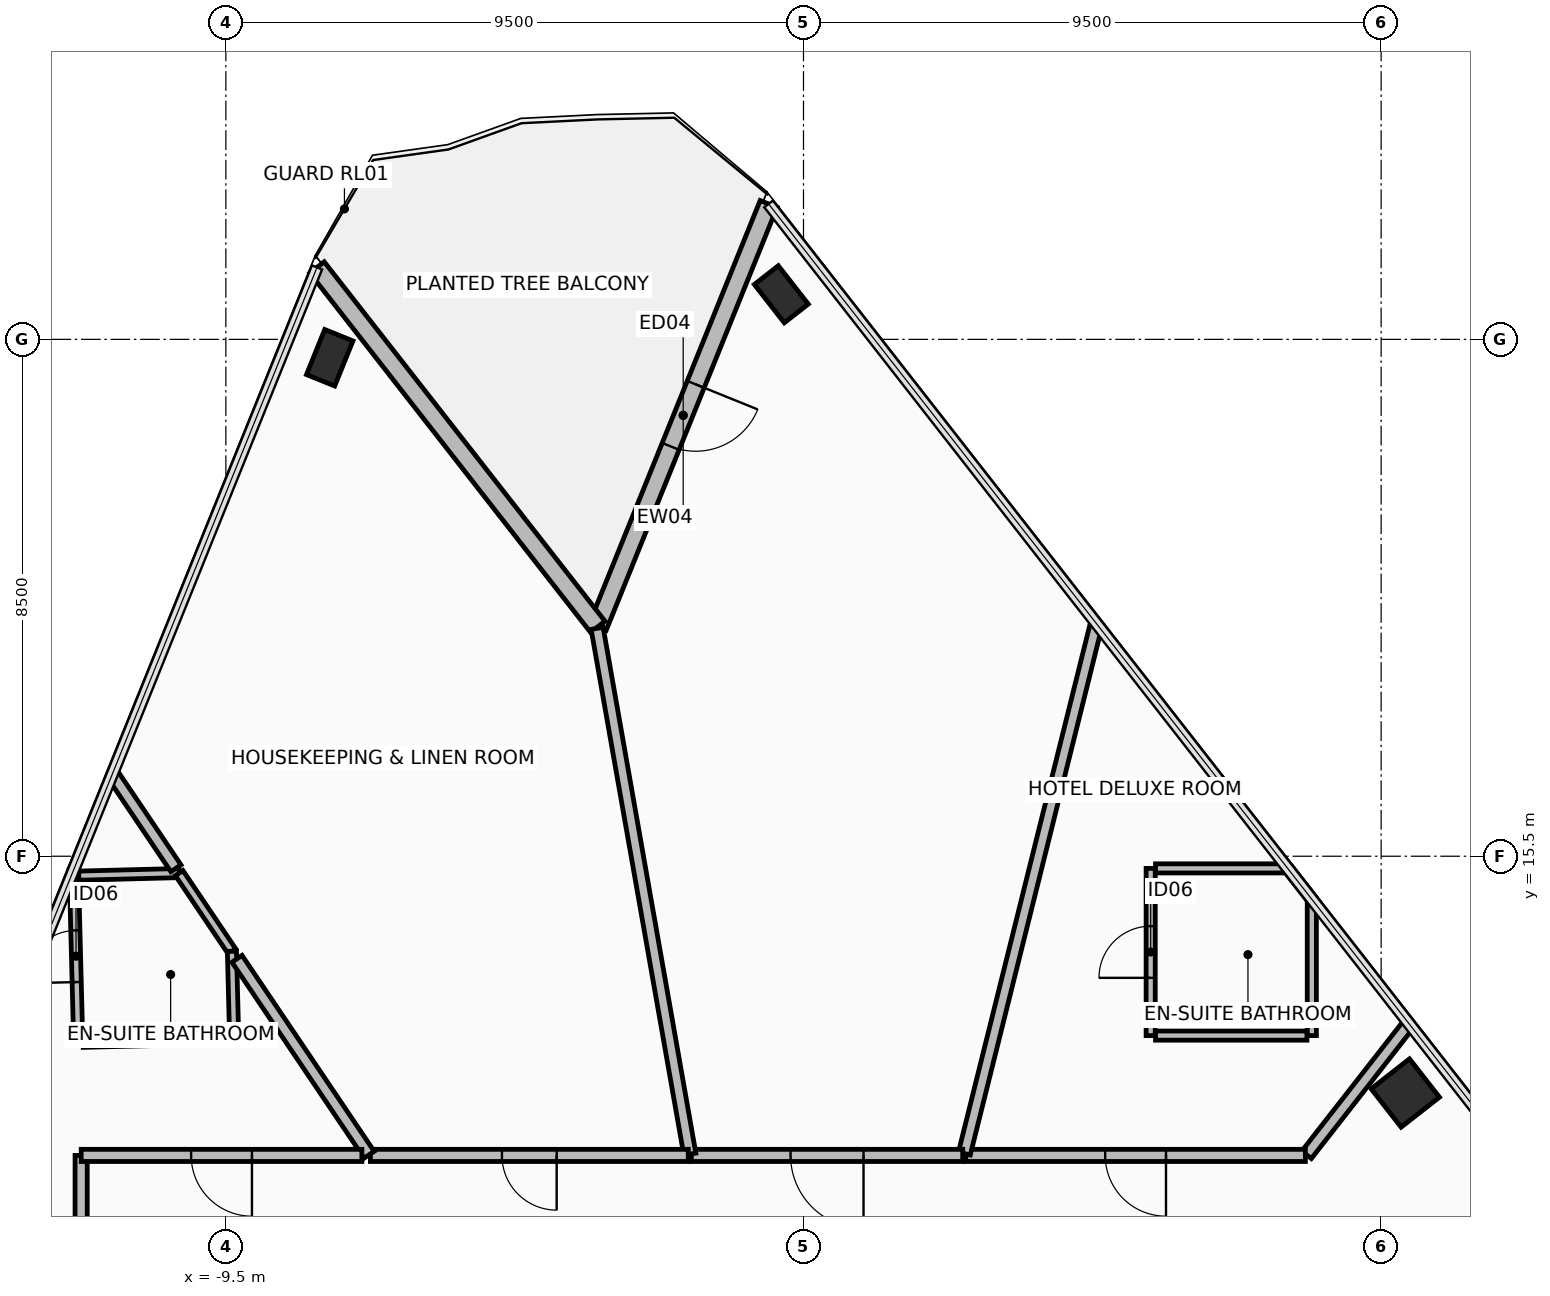
"""IFC4 building model, lengths in metres.
Left out: names, types, materials, properties, quantities, classifications, styles, units other than length and angle.
Written with IfcOpenShell. Run it as: python <this file> out.ifc"""

import sys

from ifc_helpers import new_model, si_unit, direction, frame, frame_2d, origin, origin_2d, place, context, subcontext, project, spatial, rectangle, hollow_rectangle, extrude, element, fill, save


model = new_model("IFC4")
c1 = context("Model", 3, precision=1e-05, world=origin(), true_north=direction((0.0, 1.0)))
c2 = subcontext(c1, "Body", "Model", "MODEL_VIEW")
j1 = project(units=[si_unit("LENGTHUNIT", "METRE"), si_unit("PLANEANGLEUNIT", "RADIAN")], contexts=[c1])
p1 = place(None, origin())
s1 = spatial("IfcSite", under=j1, at=p1, CompositionType="ELEMENT")
p2 = place(p1, origin())
s2 = spatial("IfcBuilding", under=s1, at=p2, CompositionType="ELEMENT")
p3 = place(p2, frame((0.0, 0.0, 60.45)))
s3 = spatial("IfcBuildingStorey", under=s2, at=p3, CompositionType="ELEMENT", Elevation=60.45)
p4 = place(p3, frame((-7.792, 23.698, 0.0), z_axis=(0.0, 0.0, 1.0), x_axis=(0.374608211656, 0.927183200754, 0.0)))
e1 = element("IfcColumn", 1, at=p4, inside=s3, PredefinedType="COLUMN", context=c2, shape_type="SweptSolid", body=[
    extrude(hollow_rectangle(XDim=0.5, YDim=0.8, WallThickness=0.04, at=origin_2d()), origin(), (0.0, 0.0, 1.0), 3.4),
])
p5 = place(p3, frame((9.898, 11.606, 0.0), z_axis=(0.0, 0.0, 1.0), x_axis=(-0.615661475326, 0.788010753607, 0.0)))
e2 = element("IfcColumn", 2, at=p5, inside=s3, PredefinedType="COLUMN", context=c2, shape_type="SweptSolid", body=[
    extrude(hollow_rectangle(XDim=0.8, YDim=0.8, WallThickness=0.045, at=origin_2d()), origin(), (0.0, 0.0, 1.0), 3.4),
])
p6 = place(p3, frame((-0.365, 24.741, 0.0), z_axis=(0.0, 0.0, 1.0), x_axis=(-0.615661475326, 0.788010753607, 0.0)))
e3 = element("IfcColumn", 3, at=p6, inside=s3, PredefinedType="COLUMN", context=c2, shape_type="SweptSolid", body=[
    extrude(hollow_rectangle(XDim=0.5, YDim=0.8, WallThickness=0.04, at=origin_2d()), origin(), (0.0, 0.0, 1.0), 3.4),
])
p7 = place(p3, frame((-0.574, 26.227, 0.0), z_axis=(0.0, 0.0, 1.0), x_axis=(-0.374609979755, -0.92718248639, 0.0)))
e4 = element("IfcWall", 4, at=p7, inside=s3, PredefinedType="STANDARD", context=c2, shape_type="SweptSolid", body=[
    extrude(rectangle(XDim=7.5, YDim=0.3, at=frame_2d((3.75, 0.0))), origin(), (0.0, 0.0, 1.0), 2.42),
])
p8 = place(p7, frame((3.2, 0.0, 0.0)))
e5 = element("IfcOpeningElement", 5, at=p8, cuts=e4, PredefinedType="OPENING", context=c2, shape_type="SweptSolid", body=[
    extrude(rectangle(XDim=1.1, YDim=2.2, at=frame_2d((0.55, 1.1))), frame((0.0, 0.16, 0.0), z_axis=(0.0, -1.0, 0.0), x_axis=(1.0, 0.0, 0.0)), (0.0, 0.0, 1.0), 0.32),
])
p9 = place(p3, frame((-3.383, 19.273, 0.0), z_axis=(0.0, 0.0, 1.0), x_axis=(-0.615654149001, 0.788016477504, 0.0)))
e6 = element("IfcWall", 6, at=p9, inside=s3, PredefinedType="STANDARD", context=c2, shape_type="SweptSolid", body=[
    extrude(rectangle(XDim=7.5, YDim=0.3, at=frame_2d((3.75, 0.0))), origin(), (0.0, 0.0, 1.0), 2.42),
])
p10 = place(p3, frame((5.71, 12.55, 0.0), z_axis=(0.0, 0.0, 1.0), x_axis=(0.0, 1.0, 0.0)))
e7 = element("IfcWall", 7, at=p10, inside=s3, PredefinedType="PARTITIONING", context=c2, shape_type="SweptSolid", body=[
    extrude(rectangle(XDim=2.75, YDim=0.15, at=frame_2d((1.375, 0.0))), origin(), (0.0, 0.0, 1.0), 2.82),
])
p11 = place(p10, frame((0.95, 0.0, 0.0)))
e8 = element("IfcOpeningElement", 8, at=p11, cuts=e7, PredefinedType="OPENING", context=c2, shape_type="SweptSolid", body=[
    extrude(rectangle(XDim=0.85, YDim=2.1, at=frame_2d((0.425, 1.05))), frame((0.0, 0.085, 0.0), z_axis=(0.0, -1.0, 0.0), x_axis=(1.0, 0.0, 0.0)), (0.0, 0.0, 1.0), 0.17),
])
p12 = place(p3, frame((5.79, 15.3, 0.0), z_axis=(0.0, 0.0, 1.0), x_axis=(1.0, 0.0, 0.0)))
e9 = element("IfcWall", 9, at=p12, inside=s3, PredefinedType="PARTITIONING", context=c2, shape_type="SweptSolid", body=[
    extrude(rectangle(XDim=2.174, YDim=0.15, at=frame_2d((1.087, 0.0))), origin(), (0.0, 0.0, 1.0), 2.42),
])
p13 = place(p3, frame((7.963, 15.3, 0.0), z_axis=(0.0, 0.0, 1.0), x_axis=(0.615592549259, -0.788064599698, 0.0)))
e10 = element("IfcWall", 10, at=p13, inside=s3, PredefinedType="PARTITIONING", context=c2, shape_type="SweptSolid", body=[
    extrude(rectangle(XDim=0.644, YDim=0.15, at=frame_2d((0.322, 0.0))), origin(), (0.0, 0.0, 1.0), 3.225),
])
p14 = place(p3, frame((8.36, 14.792, 0.0), z_axis=(0.0, 0.0, 1.0), x_axis=(0.0, -1.0, 0.0)))
e11 = element("IfcWall", 11, at=p14, inside=s3, PredefinedType="PARTITIONING", context=c2, shape_type="SweptSolid", body=[
    extrude(rectangle(XDim=2.242, YDim=0.15, at=frame_2d((1.121, 0.0))), origin(), (0.0, 0.0, 1.0), 2.42),
])
p15 = place(p3, frame((8.28, 12.55, 0.0), z_axis=(0.0, 0.0, 1.0), x_axis=(-1.0, 0.0, 0.0)))
e12 = element("IfcWall", 12, at=p15, inside=s3, PredefinedType="PARTITIONING", context=c2, shape_type="SweptSolid", body=[
    extrude(rectangle(XDim=2.49, YDim=0.15, at=frame_2d((1.245, 0.0))), origin(), (0.0, 0.0, 1.0), 2.82),
])
p16 = place(p3, frame((-11.927, 12.429, 0.0), z_axis=(0.0, 0.0, 1.0), x_axis=(-0.025753181092, 0.99966833183, 0.0)))
e13 = element("IfcWall", 13, at=p16, inside=s3, PredefinedType="PARTITIONING", context=c2, shape_type="SweptSolid", body=[
    extrude(rectangle(XDim=2.854, YDim=0.15, at=frame_2d((1.427, 0.0))), origin(), (0.0, 0.0, 1.0), 2.42),
])
p17 = place(p16, frame((1.002, 0.0, 0.0)))
e14 = element("IfcOpeningElement", 14, at=p17, cuts=e13, PredefinedType="OPENING", context=c2, shape_type="SweptSolid", body=[
    extrude(rectangle(XDim=0.85, YDim=2.1, at=frame_2d((0.425, 1.05))), frame((0.0, 0.085, 0.0), z_axis=(0.0, -1.0, 0.0), x_axis=(1.0, 0.0, 0.0)), (0.0, 0.0, 1.0), 0.17),
])
p18 = place(p3, frame((-11.918, 15.18, 0.0), z_axis=(0.0, 0.0, 1.0), x_axis=(0.999668899852, 0.02573112257, 0.0)))
e15 = element("IfcWall", 15, at=p18, inside=s3, PredefinedType="PARTITIONING", context=c2, shape_type="SweptSolid", body=[
    extrude(rectangle(XDim=1.651, YDim=0.15, at=frame_2d((0.825, 0.0))), origin(), (0.0, 0.0, 1.0), 2.42),
])
p19 = place(p3, frame((-10.268, 15.223, 0.0), z_axis=(0.0, 0.0, 1.0), x_axis=(0.559229675695, -0.82901276819, 0.0)))
e16 = element("IfcWall", 16, at=p19, inside=s3, PredefinedType="PARTITIONING", context=c2, shape_type="SweptSolid", body=[
    extrude(rectangle(XDim=1.552, YDim=0.15, at=frame_2d((0.776, 0.0))), origin(), (0.0, 0.0, 1.0), 3.225),
])
p20 = place(p3, frame((-9.4, 13.936, 0.0), z_axis=(0.0, 0.0, 1.0), x_axis=(0.025745445057, -0.999668531094, 0.0)))
e17 = element("IfcWall", 17, at=p20, inside=s3, PredefinedType="PARTITIONING", context=c2, shape_type="SweptSolid", body=[
    extrude(rectangle(XDim=1.441, YDim=0.15, at=frame_2d((0.721, 0.0))), origin(), (0.0, 0.0, 1.0), 3.225),
])
p21 = place(p3, frame((-9.443, 12.493, 0.0), z_axis=(0.0, 0.0, 1.0), x_axis=(-0.999667618691, -0.025780848324, 0.0)))
e18 = element("IfcWall", 18, at=p21, inside=s3, PredefinedType="PARTITIONING", context=c2, shape_type="SweptSolid", body=[
    extrude(rectangle(XDim=2.405, YDim=0.15, at=frame_2d((1.203, 0.0))), origin(), (0.0, 0.0, 1.0), 3.225),
])
p22 = place(p3, frame((9.947, 12.731, 0.0), z_axis=(0.0, 0.0, 1.0), x_axis=(-0.615680653303, -0.787995769753, 0.0)))
e19 = element("IfcWall", 19, at=p22, inside=s3, PredefinedType="PARTITIONING", context=c2, shape_type="SweptSolid", body=[
    extrude(rectangle(XDim=2.718, YDim=0.2, at=frame_2d((1.359, 0.0))), origin(), (0.0, 0.0, 1.0), 2.42),
])
p23 = place(p3, frame((8.254, 10.58, 0.0), z_axis=(0.0, 0.0, 1.0), x_axis=(-1.0, 0.0, 0.0)))
e20 = element("IfcWall", 20, at=p23, inside=s3, PredefinedType="PARTITIONING", context=c2, shape_type="SweptSolid", body=[
    extrude(rectangle(XDim=5.584, YDim=0.2, at=frame_2d((2.792, 0.0))), origin(), (0.0, 0.0, 1.0), 2.62),
])
p24 = place(p23, frame((2.292, 0.0, 0.0)))
e21 = element("IfcOpeningElement", 21, at=p24, cuts=e20, PredefinedType="OPENING", context=c2, shape_type="SweptSolid", body=[
    extrude(rectangle(XDim=1.0, YDim=2.15, at=frame_2d((0.5, 1.075))), frame((0.0, 0.11, 0.0), z_axis=(0.0, -1.0, 0.0), x_axis=(1.0, 0.0, 0.0)), (0.0, 0.0, 1.0), 0.22),
])
p25 = place(p3, frame((2.646, 10.611, 0.0), z_axis=(0.0, 0.0, 1.0), x_axis=(0.241940721885, 0.970291032162, 0.0)))
e22 = element("IfcWall", 22, at=p25, inside=s3, PredefinedType="PARTITIONING", context=c2, shape_type="SweptSolid", body=[
    extrude(rectangle(XDim=8.981, YDim=0.2, at=frame_2d((4.49, 0.0))), origin(), (0.0, 0.0, 1.0), 2.42),
])
p26 = place(p3, frame((2.618, 10.58, 0.0), z_axis=(0.0, 0.0, 1.0), x_axis=(-1.0, 0.0, 0.0)))
e23 = element("IfcWall", 23, at=p26, inside=s3, PredefinedType="PARTITIONING", context=c2, shape_type="SweptSolid", body=[
    extrude(rectangle(XDim=4.463, YDim=0.2, at=frame_2d((2.231, 0.0))), origin(), (0.0, 0.0, 1.0), 2.62),
])
p27 = place(p26, frame((1.631, 0.0, 0.0)))
e24 = element("IfcOpeningElement", 24, at=p27, cuts=e23, PredefinedType="OPENING", context=c2, shape_type="SweptSolid", body=[
    extrude(rectangle(XDim=1.2, YDim=2.15, at=frame_2d((0.6, 1.075))), frame((0.0, 0.11, 0.0), z_axis=(0.0, -1.0, 0.0), x_axis=(1.0, 0.0, 0.0)), (0.0, 0.0, 1.0), 0.22),
])
p28 = place(p3, frame((-1.869, 10.601, 0.0), z_axis=(0.0, 0.0, 1.0), x_axis=(-0.173639404774, 0.98480929987, 0.0)))
e25 = element("IfcWall", 25, at=p28, inside=s3, PredefinedType="PARTITIONING", context=c2, shape_type="SweptSolid", body=[
    extrude(rectangle(XDim=8.781, YDim=0.2, at=frame_2d((4.39, 0.0))), origin(), (0.0, 0.0, 1.0), 3.225),
])
p29 = place(p3, frame((-1.895, 10.58, 0.0), z_axis=(0.0, 0.0, 1.0), x_axis=(-1.0, 0.0, 0.0)))
e26 = element("IfcWall", 26, at=p29, inside=s3, PredefinedType="PARTITIONING", context=c2, shape_type="SweptSolid", body=[
    extrude(rectangle(XDim=5.228, YDim=0.2, at=frame_2d((2.614, 0.0))), origin(), (0.0, 0.0, 1.0), 3.225),
])
p30 = place(p29, frame((2.164, 0.0, 0.0)))
e27 = element("IfcOpeningElement", 27, at=p30, cuts=e26, PredefinedType="OPENING", context=c2, shape_type="SweptSolid", body=[
    extrude(rectangle(XDim=0.9, YDim=2.1, at=frame_2d((0.45, 1.05))), frame((0.0, 0.11, 0.0), z_axis=(0.0, -1.0, 0.0), x_axis=(1.0, 0.0, 0.0)), (0.0, 0.0, 1.0), 0.22),
])
p31 = place(p3, frame((-7.144, 10.591, 0.0), z_axis=(0.0, 0.0, 1.0), x_axis=(-0.559171794076, 0.829051810631, 0.0)))
e28 = element("IfcWall", 28, at=p31, inside=s3, PredefinedType="PARTITIONING", context=c2, shape_type="SweptSolid", body=[
    extrude(rectangle(XDim=3.886, YDim=0.2, at=frame_2d((1.943, 0.0))), origin(), (0.0, 0.0, 1.0), 2.57),
])
p32 = place(p3, frame((-10.321, 15.302, 0.0), z_axis=(0.0, 0.0, 1.0), x_axis=(-0.559274091042, 0.828982805062, 0.0)))
e29 = element("IfcWall", 29, at=p32, inside=s3, PredefinedType="PARTITIONING", context=c2, shape_type="SweptSolid", body=[
    extrude(rectangle(XDim=1.857, YDim=0.2, at=frame_2d((0.928, 0.0))), origin(), (0.0, 0.0, 1.0), 2.42),
])
p33 = place(p3, frame((-11.88, 10.579, 0.0), z_axis=(0.0, 0.0, 1.0), x_axis=(0.0, -1.0, 0.0)))
e30 = element("IfcWall", 30, at=p33, inside=s3, PredefinedType="PARTITIONING", context=c2, shape_type="SweptSolid", body=[
    extrude(rectangle(XDim=3.111, YDim=0.2, at=frame_2d((1.555, 0.0))), origin(), (0.0, 0.0, 1.0), 2.62),
])
p34 = place(p3, frame((-7.263, 10.58, 0.0), z_axis=(0.0, 0.0, 1.0), x_axis=(-1.0, 0.0, 0.0)))
e31 = element("IfcWall", 31, at=p34, inside=s3, PredefinedType="PARTITIONING", context=c2, shape_type="SweptSolid", body=[
    extrude(rectangle(XDim=4.616, YDim=0.2, at=frame_2d((2.308, 0.0))), origin(), (0.0, 0.0, 1.0), 2.57),
])
p35 = place(p34, frame((1.808, 0.0, 0.0)))
e32 = element("IfcOpeningElement", 32, at=p35, cuts=e31, PredefinedType="OPENING", context=c2, shape_type="SweptSolid", body=[
    extrude(rectangle(XDim=1.0, YDim=2.15, at=frame_2d((0.5, 1.075))), frame((0.0, 0.11, 0.0), z_axis=(0.0, -1.0, 0.0), x_axis=(1.0, 0.0, 0.0)), (0.0, 0.0, 1.0), 0.22),
])
p36 = place(p8, origin())
e33 = element("IfcDoor", 33, at=p36, inside=s3, OperationType="SINGLE_SWING_LEFT", PredefinedType="DOOR", context=c2, shape_type="SweptSolid", body=[
    extrude(rectangle(XDim=1.1, YDim=2.2, at=frame_2d((0.55, 1.1))), frame((0.0, 0.025, 0.0), z_axis=(0.0, -1.0, 0.0), x_axis=(1.0, 0.0, 0.0)), (0.0, 0.0, 1.0), 0.05),
])
fill(e5, e33)
p37 = place(p11, origin())
e34 = element("IfcDoor", 34, at=p37, inside=s3, OperationType="SINGLE_SWING_RIGHT", PredefinedType="DOOR", context=c2, shape_type="SweptSolid", body=[
    extrude(rectangle(XDim=0.85, YDim=2.1, at=frame_2d((0.425, 1.05))), frame((0.0, 0.025, 0.0), z_axis=(0.0, -1.0, 0.0), x_axis=(1.0, 0.0, 0.0)), (0.0, 0.0, 1.0), 0.05),
])
fill(e8, e34)
p38 = place(p17, origin())
e35 = element("IfcDoor", 35, at=p38, inside=s3, OperationType="SINGLE_SWING_RIGHT", PredefinedType="DOOR", context=c2, shape_type="SweptSolid", body=[
    extrude(rectangle(XDim=0.85, YDim=2.1, at=frame_2d((0.425, 1.05))), frame((0.0, 0.025, 0.0), z_axis=(0.0, -1.0, 0.0), x_axis=(1.0, 0.0, 0.0)), (0.0, 0.0, 1.0), 0.05),
])
fill(e14, e35)
p39 = place(p24, origin())
e36 = element("IfcDoor", 36, at=p39, inside=s3, OperationType="SINGLE_SWING_LEFT", PredefinedType="DOOR", context=c2, shape_type="SweptSolid", body=[
    extrude(rectangle(XDim=1.0, YDim=2.15, at=frame_2d((0.5, 1.075))), frame((0.0, 0.025, 0.0), z_axis=(0.0, -1.0, 0.0), x_axis=(1.0, 0.0, 0.0)), (0.0, 0.0, 1.0), 0.05),
])
fill(e21, e36)
p40 = place(p27, origin())
e37 = element("IfcDoor", 37, at=p40, inside=s3, OperationType="SINGLE_SWING_LEFT", PredefinedType="DOOR", context=c2, shape_type="SweptSolid", body=[
    extrude(rectangle(XDim=1.2, YDim=2.15, at=frame_2d((0.6, 1.075))), frame((0.0, 0.025, 0.0), z_axis=(0.0, -1.0, 0.0), x_axis=(1.0, 0.0, 0.0)), (0.0, 0.0, 1.0), 0.05),
])
fill(e24, e37)
p41 = place(p30, origin())
e38 = element("IfcDoor", 38, at=p41, inside=s3, OperationType="SINGLE_SWING_LEFT", PredefinedType="DOOR", context=c2, shape_type="SweptSolid", body=[
    extrude(rectangle(XDim=0.9, YDim=2.1, at=frame_2d((0.45, 1.05))), frame((0.0, 0.025, 0.0), z_axis=(0.0, -1.0, 0.0), x_axis=(1.0, 0.0, 0.0)), (0.0, 0.0, 1.0), 0.05),
])
fill(e27, e38)
p42 = place(p35, origin())
e39 = element("IfcDoor", 39, at=p42, inside=s3, OperationType="SINGLE_SWING_LEFT", PredefinedType="DOOR", context=c2, shape_type="SweptSolid", body=[
    extrude(rectangle(XDim=1.0, YDim=2.15, at=frame_2d((0.5, 1.075))), frame((0.0, 0.025, 0.0), z_axis=(0.0, -1.0, 0.0), x_axis=(1.0, 0.0, 0.0)), (0.0, 0.0, 1.0), 0.05),
])
fill(e32, e39)
save(model, sys.argv[1])
